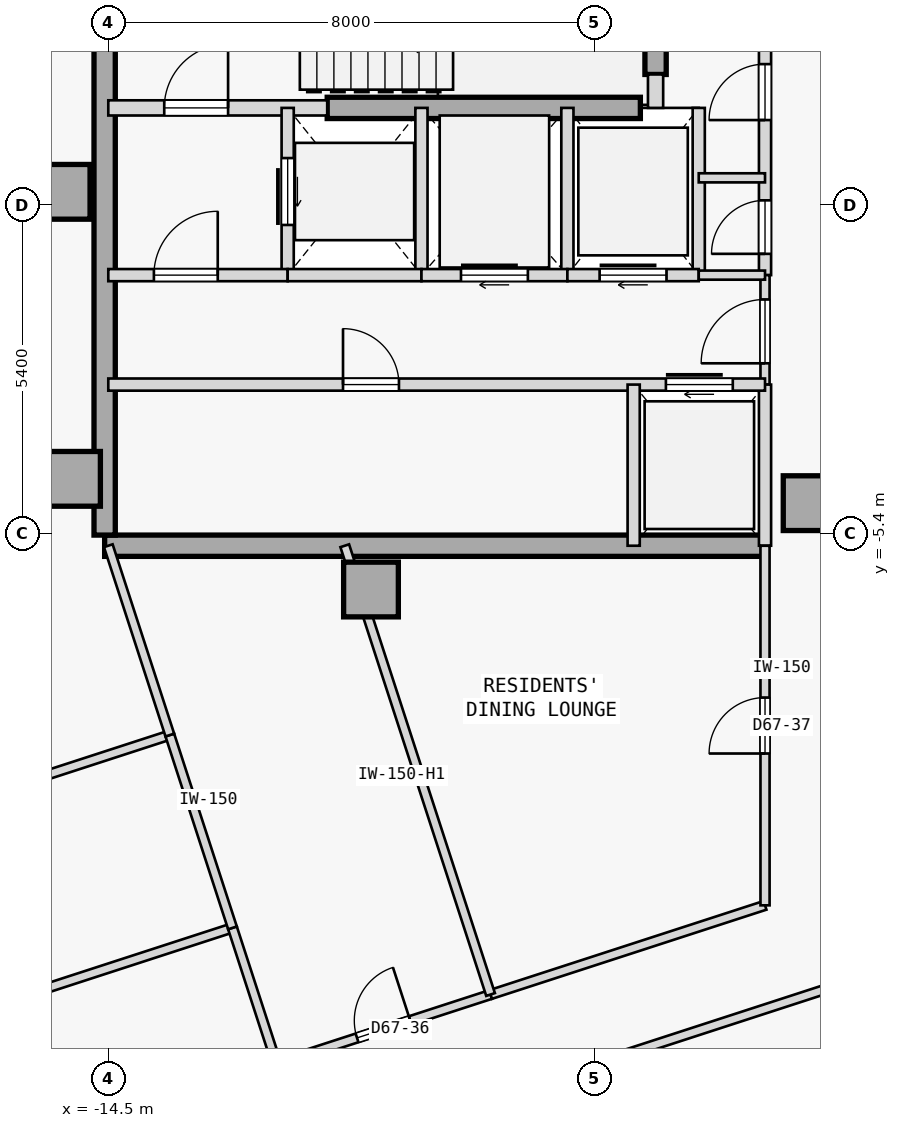
"""IFC4 building model, lengths in metres.
Left out: names, types, materials, properties, quantities, classifications, styles, units other than length and angle.
Written with IfcOpenShell. Run it as: python <this file> out.ifc"""

import sys

from ifc_helpers import new_model, si_unit, direction, frame, frame_2d, origin, origin_2d, place, context, subcontext, project, spatial, rectangle, extrude, element, fill, save


model = new_model("IFC4")
c1 = context("Model", 3, precision=1e-05, world=origin(), true_north=direction((0.0, 1.0)))
c2 = subcontext(c1, "Body", "Model", "MODEL_VIEW")
j1 = project(units=[si_unit("LENGTHUNIT", "METRE"), si_unit("PLANEANGLEUNIT", "RADIAN")], contexts=[c1])
p1 = place(None, origin())
s1 = spatial("IfcSite", under=j1, at=p1, CompositionType="ELEMENT")
p2 = place(p1, origin())
s2 = spatial("IfcBuilding", under=s1, at=p2, CompositionType="ELEMENT")
p3 = place(p2, frame((0.0, 0.0, 251.1)))
s3 = spatial("IfcBuildingStorey", under=s2, at=p3, CompositionType="ELEMENT", Elevation=251.1)
for number, where, z_axis, x_axis in (
    (1, (-15.25, 0.22, 0.0), (0.0, 0.0, 1.0), (1.0, 0.0, 0.0)),
    (2, (-15.08, -4.5, 0.0), (0.0, 0.0, 1.0), (1.0, 0.0, 0.0)),
    (3, (-10.18, -6.32, 0.0), (0.0, 0.0, 1.0), (1.0, 0.0, 0.0)),
    (4, (-2.95, -4.9, 0.0), (0.0, 0.0, 1.0), (1.0, 0.0, 0.0)),
):
    element("IfcColumn", number, at=place(p3, frame(where, z_axis=z_axis, x_axis=x_axis)), inside=s3, PredefinedType="COLUMN", context=c2, shape_type="SweptSolid", body=[
        extrude(rectangle(XDim=0.9, YDim=0.9, at=origin_2d()), origin(), (0.0, 0.0, 1.0), 3.35),
    ])
p4 = place(p3, frame((-14.56, -5.6, 0.0), z_axis=(0.0, 0.0, 1.0), x_axis=(1.0, 0.0, 0.0)))
e5 = element("IfcWall", 5, at=p4, inside=s3, PredefinedType="SHEAR", context=c2, shape_type="SweptSolid", body=[
    extrude(rectangle(XDim=10.86, YDim=0.35, at=frame_2d((5.43, 0.0))), origin(), (0.0, 0.0, 1.0), 2.95),
])
p5 = place(p3, frame((-14.56, -5.425, 0.0), z_axis=(0.0, 0.0, 1.0), x_axis=(0.0, 1.0, 0.0)))
e6 = element("IfcWall", 6, at=p5, inside=s3, PredefinedType="SHEAR", context=c2, shape_type="SweptSolid", body=[
    extrude(rectangle(XDim=10.85, YDim=0.35, at=frame_2d((5.425, 0.0))), origin(), (0.0, 0.0, 1.0), 2.95),
])
p6 = place(p3, frame((-5.5, 2.15, 0.0), z_axis=(0.0, 0.0, 1.0), x_axis=(0.0, 1.0, 0.0)))
e7 = element("IfcWall", 7, at=p6, inside=s3, PredefinedType="SHEAR", context=c2, shape_type="SweptSolid", body=[
    extrude(rectangle(XDim=3.275, YDim=0.35, at=frame_2d((1.638, 0.0))), origin(), (0.0, 0.0, 1.0), 2.95),
])
p7 = place(p3, frame((-10.9, 1.6, 0.0), z_axis=(0.0, 0.0, 1.0), x_axis=(1.0, 0.0, 0.0)))
e8 = element("IfcWall", 8, at=p7, inside=s3, PredefinedType="SHEAR", context=c2, shape_type="SweptSolid", body=[
    extrude(rectangle(XDim=5.15, YDim=0.35, at=frame_2d((2.575, 0.0))), origin(), (0.0, 0.0, 1.0), 2.95),
])
p8 = place(p3, frame((-14.5, 1.6, 0.0), z_axis=(0.0, 0.0, 1.0), x_axis=(1.0, 0.0, 0.0)))
e9 = element("IfcWall", 9, at=p8, inside=s3, PredefinedType="STANDARD", context=c2, shape_type="SweptSolid", body=[
    extrude(rectangle(XDim=3.6, YDim=0.25, at=frame_2d((1.8, 0.0))), origin(), (0.0, 0.0, 1.0), 2.95),
])
p9 = place(p8, frame((0.92, 0.0, 0.0)))
e10 = element("IfcOpeningElement", 10, at=p9, cuts=e9, PredefinedType="OPENING", context=c2, shape_type="SweptSolid", body=[
    extrude(rectangle(XDim=1.05, YDim=2.15, at=frame_2d((0.525, 1.075))), frame((0.0, 0.135, 0.0), z_axis=(0.0, -1.0, 0.0), x_axis=(1.0, 0.0, 0.0)), (0.0, 0.0, 1.0), 0.27),
])
p10 = place(p3, frame((-5.5, 1.6, 0.0), z_axis=(0.0, 0.0, 1.0), x_axis=(0.0, 1.0, 0.0)))
e11 = element("IfcWall", 11, at=p10, inside=s3, PredefinedType="STANDARD", context=c2, shape_type="SweptSolid", body=[
    extrude(rectangle(XDim=0.55, YDim=0.25, at=frame_2d((0.275, 0.0))), origin(), (0.0, 0.0, 1.0), 2.95),
])
p11 = place(p3, frame((-3.7, -1.15, 0.0), z_axis=(0.0, 0.0, 1.0), x_axis=(0.0, 1.0, 0.0)))
e12 = element("IfcWall", 12, at=p11, inside=s3, PredefinedType="STANDARD", context=c2, shape_type="SweptSolid", body=[
    extrude(rectangle(XDim=6.75, YDim=0.2, at=frame_2d((3.375, 0.0))), origin(), (0.0, 0.0, 1.0), 2.95),
])
p12 = place(p11, frame((0.35, 0.0, 0.0)))
e13 = element("IfcOpeningElement", 13, at=p12, cuts=e12, PredefinedType="OPENING", context=c2, shape_type="SweptSolid", body=[
    extrude(rectangle(XDim=0.88, YDim=2.15, at=frame_2d((0.44, 1.075))), frame((0.0, 0.11, 0.0), z_axis=(0.0, -1.0, 0.0), x_axis=(1.0, 0.0, 0.0)), (0.0, 0.0, 1.0), 0.22),
])
p13 = place(p11, frame((2.55, 0.0, 0.0)))
e14 = element("IfcOpeningElement", 14, at=p13, cuts=e12, PredefinedType="OPENING", context=c2, shape_type="SweptSolid", body=[
    extrude(rectangle(XDim=0.92, YDim=2.15, at=frame_2d((0.46, 1.075))), frame((0.0, 0.11, 0.0), z_axis=(0.0, -1.0, 0.0), x_axis=(1.0, 0.0, 0.0)), (0.0, 0.0, 1.0), 0.22),
])
p14 = place(p11, frame((4.22, 0.0, 0.0)))
e15 = element("IfcOpeningElement", 15, at=p14, cuts=e12, PredefinedType="OPENING", context=c2, shape_type="SweptSolid", body=[
    extrude(rectangle(XDim=0.88, YDim=2.15, at=frame_2d((0.44, 1.075))), frame((0.0, 0.11, 0.0), z_axis=(0.0, -1.0, 0.0), x_axis=(1.0, 0.0, 0.0)), (0.0, 0.0, 1.0), 0.22),
])
p15 = place(p3, frame((-3.7, -2.95, 0.0), z_axis=(0.0, 0.0, 1.0), x_axis=(0.0, 1.0, 0.0)))
e16 = element("IfcWall", 16, at=p15, inside=s3, PredefinedType="PARTITIONING", context=c2, shape_type="SweptSolid", body=[
    extrude(rectangle(XDim=1.8, YDim=0.15, at=frame_2d((0.9, 0.0))), origin(), (0.0, 0.0, 1.0), 2.95),
])
p16 = place(p15, frame((0.35, 0.0, 0.0)))
e17 = element("IfcOpeningElement", 17, at=p16, cuts=e16, PredefinedType="OPENING", context=c2, shape_type="SweptSolid", body=[
    extrude(rectangle(XDim=1.05, YDim=2.18, at=frame_2d((0.525, 1.09))), frame((0.0, 0.085, 0.0), z_axis=(0.0, -1.0, 0.0), x_axis=(1.0, 0.0, 0.0)), (0.0, 0.0, 1.0), 0.17),
])
p17 = place(p3, frame((-3.7, -5.6, 0.0), z_axis=(0.0, 0.0, 1.0), x_axis=(0.0, 1.0, 0.0)))
e18 = element("IfcWall", 18, at=p17, inside=s3, PredefinedType="STANDARD", context=c2, shape_type="SweptSolid", body=[
    extrude(rectangle(XDim=2.65, YDim=0.2, at=frame_2d((1.325, 0.0))), origin(), (0.0, 0.0, 1.0), 2.95),
])
p18 = place(p3, frame((-11.55, -1.15, 0.0), z_axis=(0.0, 0.0, 1.0), x_axis=(0.0, 1.0, 0.0)))
e19 = element("IfcWall", 19, at=p18, inside=s3, PredefinedType="STANDARD", context=c2, shape_type="SweptSolid", body=[
    extrude(rectangle(XDim=2.75, YDim=0.2, at=frame_2d((1.375, 0.0))), origin(), (0.0, 0.0, 1.0), 2.95),
])
p19 = place(p18, frame((0.825, 0.0, 0.0)))
e20 = element("IfcOpeningElement", 20, at=p19, cuts=e19, PredefinedType="OPENING", context=c2, shape_type="SweptSolid", body=[
    extrude(rectangle(XDim=1.1, YDim=2.15, at=frame_2d((0.55, 1.075))), frame((0.0, 0.11, 0.0), z_axis=(0.0, -1.0, 0.0), x_axis=(1.0, 0.0, 0.0)), (0.0, 0.0, 1.0), 0.22),
])
p20 = place(p3, frame((-9.35, -1.15, 0.0), z_axis=(0.0, 0.0, 1.0), x_axis=(0.0, 1.0, 0.0)))
e21 = element("IfcWall", 21, at=p20, inside=s3, PredefinedType="STANDARD", context=c2, shape_type="SweptSolid", body=[
    extrude(rectangle(XDim=2.75, YDim=0.2, at=frame_2d((1.375, 0.0))), origin(), (0.0, 0.0, 1.0), 2.95),
])
p21 = place(p3, frame((-14.5, -1.15, 0.0), z_axis=(0.0, 0.0, 1.0), x_axis=(1.0, 0.0, 0.0)))
e22 = element("IfcWall", 22, at=p21, inside=s3, PredefinedType="STANDARD", context=c2, shape_type="SweptSolid", body=[
    extrude(rectangle(XDim=2.95, YDim=0.2, at=frame_2d((1.475, 0.0))), origin(), (0.0, 0.0, 1.0), 2.95),
])
p22 = place(p21, frame((0.75, 0.0, 0.0)))
e23 = element("IfcOpeningElement", 23, at=p22, cuts=e22, PredefinedType="OPENING", context=c2, shape_type="SweptSolid", body=[
    extrude(rectangle(XDim=1.05, YDim=2.18, at=frame_2d((0.525, 1.09))), frame((0.0, 0.11, 0.0), z_axis=(0.0, -1.0, 0.0), x_axis=(1.0, 0.0, 0.0)), (0.0, 0.0, 1.0), 0.22),
])
p23 = place(p3, frame((-11.55, -1.15, 0.0), z_axis=(0.0, 0.0, 1.0), x_axis=(1.0, 0.0, 0.0)))
e24 = element("IfcWall", 24, at=p23, inside=s3, PredefinedType="STANDARD", context=c2, shape_type="SweptSolid", body=[
    extrude(rectangle(XDim=2.2, YDim=0.2, at=frame_2d((1.1, 0.0))), origin(), (0.0, 0.0, 1.0), 2.95),
])
p24 = place(p3, frame((-6.95, -1.15, 0.0), z_axis=(0.0, 0.0, 1.0), x_axis=(0.0, 1.0, 0.0)))
e25 = element("IfcWall", 25, at=p24, inside=s3, PredefinedType="STANDARD", context=c2, shape_type="SweptSolid", body=[
    extrude(rectangle(XDim=2.75, YDim=0.2, at=frame_2d((1.375, 0.0))), origin(), (0.0, 0.0, 1.0), 2.95),
])
p25 = place(p3, frame((-9.35, -1.15, 0.0), z_axis=(0.0, 0.0, 1.0), x_axis=(1.0, 0.0, 0.0)))
e26 = element("IfcWall", 26, at=p25, inside=s3, PredefinedType="STANDARD", context=c2, shape_type="SweptSolid", body=[
    extrude(rectangle(XDim=2.4, YDim=0.2, at=frame_2d((1.2, 0.0))), origin(), (0.0, 0.0, 1.0), 2.95),
])
p26 = place(p25, frame((0.65, 0.0, 0.0)))
e27 = element("IfcOpeningElement", 27, at=p26, cuts=e26, PredefinedType="OPENING", context=c2, shape_type="SweptSolid", body=[
    extrude(rectangle(XDim=1.1, YDim=2.15, at=frame_2d((0.55, 1.075))), frame((0.0, 0.11, 0.0), z_axis=(0.0, -1.0, 0.0), x_axis=(1.0, 0.0, 0.0)), (0.0, 0.0, 1.0), 0.22),
])
p27 = place(p3, frame((-4.79, -1.15, 0.0), z_axis=(0.0, 0.0, 1.0), x_axis=(0.0, 1.0, 0.0)))
e28 = element("IfcWall", 28, at=p27, inside=s3, PredefinedType="STANDARD", context=c2, shape_type="SweptSolid", body=[
    extrude(rectangle(XDim=2.75, YDim=0.2, at=frame_2d((1.375, 0.0))), origin(), (0.0, 0.0, 1.0), 2.95),
])
p28 = place(p3, frame((-6.95, -1.15, 0.0), z_axis=(0.0, 0.0, 1.0), x_axis=(1.0, 0.0, 0.0)))
e29 = element("IfcWall", 29, at=p28, inside=s3, PredefinedType="STANDARD", context=c2, shape_type="SweptSolid", body=[
    extrude(rectangle(XDim=2.16, YDim=0.2, at=frame_2d((1.08, 0.0))), origin(), (0.0, 0.0, 1.0), 2.95),
])
p29 = place(p28, frame((0.53, 0.0, 0.0)))
e30 = element("IfcOpeningElement", 30, at=p29, cuts=e29, PredefinedType="OPENING", context=c2, shape_type="SweptSolid", body=[
    extrude(rectangle(XDim=1.1, YDim=2.15, at=frame_2d((0.55, 1.075))), frame((0.0, 0.11, 0.0), z_axis=(0.0, -1.0, 0.0), x_axis=(1.0, 0.0, 0.0)), (0.0, 0.0, 1.0), 0.22),
])
p30 = place(p3, frame((-4.79, -1.15, 0.0), z_axis=(0.0, 0.0, 1.0), x_axis=(1.0, 0.0, 0.0)))
e31 = element("IfcWall", 31, at=p30, inside=s3, PredefinedType="PARTITIONING", context=c2, shape_type="SweptSolid", body=[
    extrude(rectangle(XDim=1.09, YDim=0.15, at=frame_2d((0.545, 0.0))), origin(), (0.0, 0.0, 1.0), 2.95),
])
p31 = place(p3, frame((-14.5, -2.95, 0.0), z_axis=(0.0, 0.0, 1.0), x_axis=(1.0, 0.0, 0.0)))
e32 = element("IfcWall", 32, at=p31, inside=s3, PredefinedType="STANDARD", context=c2, shape_type="SweptSolid", body=[
    extrude(rectangle(XDim=10.8, YDim=0.2, at=frame_2d((5.4, 0.0))), origin(), (0.0, 0.0, 1.0), 2.95),
])
p32 = place(p31, frame((9.17, 0.0, 0.0)))
e33 = element("IfcOpeningElement", 33, at=p32, cuts=e32, PredefinedType="OPENING", context=c2, shape_type="SweptSolid", body=[
    extrude(rectangle(XDim=1.1, YDim=2.15, at=frame_2d((0.55, 1.075))), frame((0.0, 0.11, 0.0), z_axis=(0.0, -1.0, 0.0), x_axis=(1.0, 0.0, 0.0)), (0.0, 0.0, 1.0), 0.22),
])
p33 = place(p31, frame((3.86, 0.0, 0.0)))
e34 = element("IfcOpeningElement", 34, at=p33, cuts=e32, PredefinedType="OPENING", context=c2, shape_type="SweptSolid", body=[
    extrude(rectangle(XDim=0.92, YDim=2.15, at=frame_2d((0.46, 1.075))), frame((0.0, 0.11, 0.0), z_axis=(0.0, -1.0, 0.0), x_axis=(1.0, 0.0, 0.0)), (0.0, 0.0, 1.0), 0.22),
])
p34 = place(p3, frame((-5.86, -5.6, 0.0), z_axis=(0.0, 0.0, 1.0), x_axis=(0.0, 1.0, 0.0)))
e35 = element("IfcWall", 35, at=p34, inside=s3, PredefinedType="STANDARD", context=c2, shape_type="SweptSolid", body=[
    extrude(rectangle(XDim=2.65, YDim=0.2, at=frame_2d((1.325, 0.0))), origin(), (0.0, 0.0, 1.0), 2.95),
])
p35 = place(p3, frame((-4.79, 0.45, 0.0), z_axis=(0.0, 0.0, 1.0), x_axis=(1.0, 0.0, 0.0)))
e36 = element("IfcWall", 36, at=p35, inside=s3, PredefinedType="PARTITIONING", context=c2, shape_type="SweptSolid", body=[
    extrude(rectangle(XDim=1.09, YDim=0.15, at=frame_2d((0.545, 0.0))), origin(), (0.0, 0.0, 1.0), 2.95),
])
p36 = place(p3, frame((-16.482, -17.37, 0.0), z_axis=(0.0, 0.0, 1.0), x_axis=(0.9510563751, 0.309017428929, 0.0)))
e37 = element("IfcWall", 37, at=p36, inside=s3, PredefinedType="PARTITIONING", context=c2, shape_type="SweptSolid", body=[
    extrude(rectangle(XDim=15.602, YDim=0.15, at=frame_2d((7.801, 0.0))), origin(), (0.0, 0.0, 1.0), 2.95),
])
p37 = place(p36, frame((7.326, 0.0, 0.0)))
e38 = element("IfcOpeningElement", 38, at=p37, cuts=e37, PredefinedType="OPENING", context=c2, shape_type="SweptSolid", body=[
    extrude(rectangle(XDim=0.95, YDim=2.15, at=frame_2d((0.475, 1.075))), frame((0.0, 0.085, 0.0), z_axis=(0.0, -1.0, 0.0), x_axis=(1.0, 0.0, 0.0)), (0.0, 0.0, 1.0), 0.17),
])
p38 = place(p3, frame((-11.73, -14.123, 0.0), z_axis=(0.0, 0.0, 1.0), x_axis=(0.951052502763, 0.309029346483, 0.0)))
e39 = element("IfcWall", 39, at=p38, inside=s3, PredefinedType="PARTITIONING", context=c2, shape_type="SweptSolid", body=[
    extrude(rectangle(XDim=3.698, YDim=0.15, at=frame_2d((1.849, 0.0))), origin(), (0.0, 0.0, 1.0), 2.95),
])
p39 = place(p38, frame((1.389, 0.0, 0.0)))
e40 = element("IfcOpeningElement", 40, at=p39, cuts=e39, PredefinedType="OPENING", context=c2, shape_type="SweptSolid", body=[
    extrude(rectangle(XDim=0.92, YDim=2.15, at=frame_2d((0.46, 1.075))), frame((0.0, 0.085, 0.0), z_axis=(0.0, -1.0, 0.0), x_axis=(1.0, 0.0, 0.0)), (0.0, 0.0, 1.0), 0.17),
])
p40 = place(p3, frame((-8.213, -12.98, 0.0), z_axis=(0.0, 0.0, 1.0), x_axis=(0.951058260096, 0.309011627456, 0.0)))
e41 = element("IfcWall", 41, at=p40, inside=s3, PredefinedType="PARTITIONING", context=c2, shape_type="SweptSolid", body=[
    extrude(rectangle(XDim=4.746, YDim=0.15, at=frame_2d((2.373, 0.0))), origin(), (0.0, 0.0, 1.0), 2.95),
])
p41 = place(p3, frame((-3.7, -11.514, 0.0), z_axis=(0.0, 0.0, 1.0), x_axis=(-8.2572974e-05, 0.999999996591, 0.0)))
e42 = element("IfcWall", 42, at=p41, inside=s3, PredefinedType="PARTITIONING", context=c2, shape_type="SweptSolid", body=[
    extrude(rectangle(XDim=5.913, YDim=0.15, at=frame_2d((2.957, 0.0))), origin(), (0.0, 0.0, 1.0), 2.95),
])
p42 = place(p41, frame((2.497, 0.0, 0.0)))
e43 = element("IfcOpeningElement", 43, at=p42, cuts=e42, PredefinedType="OPENING", context=c2, shape_type="SweptSolid", body=[
    extrude(rectangle(XDim=0.92, YDim=2.15, at=frame_2d((0.46, 1.075))), frame((0.0, 0.085, 0.0), z_axis=(0.0, -1.0, 0.0), x_axis=(1.0, 0.0, 0.0)), (0.0, 0.0, 1.0), 0.17),
])
p43 = place(p3, frame((-30.178, -17.642, 0.0), z_axis=(0.0, 0.0, 1.0), x_axis=(0.95105650271, 0.309017036186, 0.0)))
e44 = element("IfcWall", 44, at=p43, inside=s3, PredefinedType="PARTITIONING", context=c2, shape_type="SweptSolid", body=[
    extrude(rectangle(XDim=18.632, YDim=0.15, at=frame_2d((9.316, 0.0))), origin(), (0.0, 0.0, 1.0), 2.95),
])
p44 = place(p43, frame((8.856, 0.0, 0.0)))
e45 = element("IfcOpeningElement", 45, at=p44, cuts=e44, PredefinedType="OPENING", context=c2, shape_type="SweptSolid", body=[
    extrude(rectangle(XDim=0.92, YDim=2.15, at=frame_2d((0.46, 1.075))), frame((0.0, 0.085, 0.0), z_axis=(0.0, -1.0, 0.0), x_axis=(1.0, 0.0, 0.0)), (0.0, 0.0, 1.0), 0.17),
])
p45 = place(p3, frame((-11.73, -14.123, 0.0), z_axis=(0.0, 0.0, 1.0), x_axis=(-0.309062621189, 0.951041690035, 0.0)))
e46 = element("IfcWall", 46, at=p45, inside=s3, PredefinedType="PARTITIONING", context=c2, shape_type="SweptSolid", body=[
    extrude(rectangle(XDim=2.354, YDim=0.15, at=frame_2d((1.177, 0.0))), origin(), (0.0, 0.0, 1.0), 2.95),
])
p46 = place(p3, frame((-31.208, -14.471, 0.0), z_axis=(0.0, 0.0, 1.0), x_axis=(0.951057753948, 0.309013185244, 0.0)))
e47 = element("IfcWall", 47, at=p46, inside=s3, PredefinedType="PARTITIONING", context=c2, shape_type="SweptSolid", body=[
    extrude(rectangle(XDim=18.632, YDim=0.15, at=frame_2d((9.316, 0.0))), origin(), (0.0, 0.0, 1.0), 2.95),
])
p47 = place(p3, frame((-12.458, -11.884, 0.0), z_axis=(0.0, 0.0, 1.0), x_axis=(-0.308946982245, 0.951079261766, 0.0)))
e48 = element("IfcWall", 48, at=p47, inside=s3, PredefinedType="PARTITIONING", context=c2, shape_type="SweptSolid", body=[
    extrude(rectangle(XDim=3.334, YDim=0.15, at=frame_2d((1.667, 0.0))), origin(), (0.0, 0.0, 1.0), 2.95),
])
p48 = place(p3, frame((-30.663, -9.757, 0.0), z_axis=(0.0, 0.0, 1.0), x_axis=(0.951058192995, 0.309011833974, 0.0)))
e49 = element("IfcWall", 49, at=p48, inside=s3, PredefinedType="PARTITIONING", context=c2, shape_type="SweptSolid", body=[
    extrude(rectangle(XDim=16.657, YDim=0.15, at=frame_2d((8.329, 0.0))), origin(), (0.0, 0.0, 1.0), 2.17),
])
p49 = place(p3, frame((-13.488, -8.713, 0.0), z_axis=(0.0, 0.0, 1.0), x_axis=(-0.309082700143, 0.951035164687, 0.0)))
e50 = element("IfcWall", 50, at=p49, inside=s3, PredefinedType="PARTITIONING", context=c2, shape_type="SweptSolid", body=[
    extrude(rectangle(XDim=3.274, YDim=0.15, at=frame_2d((1.637, 0.0))), origin(), (0.0, 0.0, 1.0), 2.95),
])
p50 = place(p3, frame((-8.213, -12.98, 0.0), z_axis=(0.0, 0.0, 1.0), x_axis=(-0.309017065592, 0.951056493155, 0.0)))
e51 = element("IfcWall", 51, at=p50, inside=s3, PredefinedType="PARTITIONING", context=c2, shape_type="SweptSolid", body=[
    extrude(rectangle(XDim=7.76, YDim=0.15, at=frame_2d((3.88, 0.0))), origin(), (0.0, 0.0, 1.0), 2.5),
])
p51 = place(p9, origin())
e52 = element("IfcDoor", 52, at=p51, inside=s3, OperationType="SINGLE_SWING_RIGHT", PredefinedType="DOOR", context=c2, shape_type="SweptSolid", body=[
    extrude(rectangle(XDim=1.05, YDim=2.15, at=frame_2d((0.525, 1.075))), frame((0.0, 0.025, 0.0), z_axis=(0.0, -1.0, 0.0), x_axis=(1.0, 0.0, 0.0)), (0.0, 0.0, 1.0), 0.05),
])
fill(e10, e52)
p52 = place(p22, origin())
e53 = element("IfcDoor", 53, at=p52, inside=s3, OperationType="SINGLE_SWING_RIGHT", PredefinedType="DOOR", context=c2, shape_type="SweptSolid", body=[
    extrude(rectangle(XDim=1.05, YDim=2.18, at=frame_2d((0.525, 1.09))), frame((0.0, 0.025, 0.0), z_axis=(0.0, -1.0, 0.0), x_axis=(1.0, 0.0, 0.0)), (0.0, 0.0, 1.0), 0.05),
])
fill(e23, e53)
p53 = place(p16, origin())
e54 = element("IfcDoor", 54, at=p53, inside=s3, OperationType="SINGLE_SWING_LEFT", PredefinedType="DOOR", context=c2, shape_type="SweptSolid", body=[
    extrude(rectangle(XDim=1.05, YDim=2.18, at=frame_2d((0.525, 1.09))), frame((0.0, 0.025, 0.0), z_axis=(0.0, -1.0, 0.0), x_axis=(1.0, 0.0, 0.0)), (0.0, 0.0, 1.0), 0.05),
])
fill(e17, e54)
p54 = place(p19, origin())
e55 = element("IfcDoor", 55, at=p54, inside=s3, OperationType="SLIDING_TO_RIGHT", PredefinedType="DOOR", context=c2, shape_type="SweptSolid", body=[
    extrude(rectangle(XDim=1.1, YDim=2.15, at=frame_2d((0.55, 1.075))), frame((0.0, 0.025, 0.0), z_axis=(0.0, -1.0, 0.0), x_axis=(1.0, 0.0, 0.0)), (0.0, 0.0, 1.0), 0.05),
])
fill(e20, e55)
p55 = place(p26, origin())
e56 = element("IfcDoor", 56, at=p55, inside=s3, OperationType="SLIDING_TO_RIGHT", PredefinedType="DOOR", context=c2, shape_type="SweptSolid", body=[
    extrude(rectangle(XDim=1.1, YDim=2.15, at=frame_2d((0.55, 1.075))), frame((0.0, 0.025, 0.0), z_axis=(0.0, -1.0, 0.0), x_axis=(1.0, 0.0, 0.0)), (0.0, 0.0, 1.0), 0.05),
])
fill(e27, e56)
p56 = place(p29, origin())
e57 = element("IfcDoor", 57, at=p56, inside=s3, OperationType="SLIDING_TO_RIGHT", PredefinedType="DOOR", context=c2, shape_type="SweptSolid", body=[
    extrude(rectangle(XDim=1.1, YDim=2.15, at=frame_2d((0.55, 1.075))), frame((0.0, 0.025, 0.0), z_axis=(0.0, -1.0, 0.0), x_axis=(1.0, 0.0, 0.0)), (0.0, 0.0, 1.0), 0.05),
])
fill(e30, e57)
p57 = place(p32, origin())
e58 = element("IfcDoor", 58, at=p57, inside=s3, OperationType="SLIDING_TO_RIGHT", PredefinedType="DOOR", context=c2, shape_type="SweptSolid", body=[
    extrude(rectangle(XDim=1.1, YDim=2.15, at=frame_2d((0.55, 1.075))), frame((0.0, 0.025, 0.0), z_axis=(0.0, -1.0, 0.0), x_axis=(1.0, 0.0, 0.0)), (0.0, 0.0, 1.0), 0.05),
])
fill(e33, e58)
p58 = place(p33, origin())
e59 = element("IfcDoor", 59, at=p58, inside=s3, OperationType="SINGLE_SWING_LEFT", PredefinedType="DOOR", context=c2, shape_type="SweptSolid", body=[
    extrude(rectangle(XDim=0.92, YDim=2.15, at=frame_2d((0.46, 1.075))), frame((0.0, 0.025, 0.0), z_axis=(0.0, -1.0, 0.0), x_axis=(1.0, 0.0, 0.0)), (0.0, 0.0, 1.0), 0.05),
])
fill(e34, e59)
p59 = place(p12, origin())
e60 = element("IfcDoor", 60, at=p59, inside=s3, OperationType="SINGLE_SWING_LEFT", PredefinedType="DOOR", context=c2, shape_type="SweptSolid", body=[
    extrude(rectangle(XDim=0.88, YDim=2.15, at=frame_2d((0.44, 1.075))), frame((0.0, 0.025, 0.0), z_axis=(0.0, -1.0, 0.0), x_axis=(1.0, 0.0, 0.0)), (0.0, 0.0, 1.0), 0.05),
])
fill(e13, e60)
p60 = place(p13, origin())
e61 = element("IfcDoor", 61, at=p60, inside=s3, OperationType="SINGLE_SWING_LEFT", PredefinedType="DOOR", context=c2, shape_type="SweptSolid", body=[
    extrude(rectangle(XDim=0.92, YDim=2.15, at=frame_2d((0.46, 1.075))), frame((0.0, 0.025, 0.0), z_axis=(0.0, -1.0, 0.0), x_axis=(1.0, 0.0, 0.0)), (0.0, 0.0, 1.0), 0.05),
])
fill(e14, e61)
p61 = place(p39, origin())
e62 = element("IfcDoor", 62, at=p61, inside=s3, OperationType="SINGLE_SWING_RIGHT", PredefinedType="DOOR", context=c2, shape_type="SweptSolid", body=[
    extrude(rectangle(XDim=0.92, YDim=2.15, at=frame_2d((0.46, 1.075))), frame((0.0, 0.025, 0.0), z_axis=(0.0, -1.0, 0.0), x_axis=(1.0, 0.0, 0.0)), (0.0, 0.0, 1.0), 0.05),
])
fill(e40, e62)
p62 = place(p42, origin())
e63 = element("IfcDoor", 63, at=p62, inside=s3, OperationType="SINGLE_SWING_LEFT", PredefinedType="DOOR", context=c2, shape_type="SweptSolid", body=[
    extrude(rectangle(XDim=0.92, YDim=2.15, at=frame_2d((0.46, 1.075))), frame((0.0, 0.025, 0.0), z_axis=(0.0, -1.0, 0.0), x_axis=(1.0, 0.0, 0.0)), (0.0, 0.0, 1.0), 0.05),
])
fill(e43, e63)
save(model, sys.argv[1])
